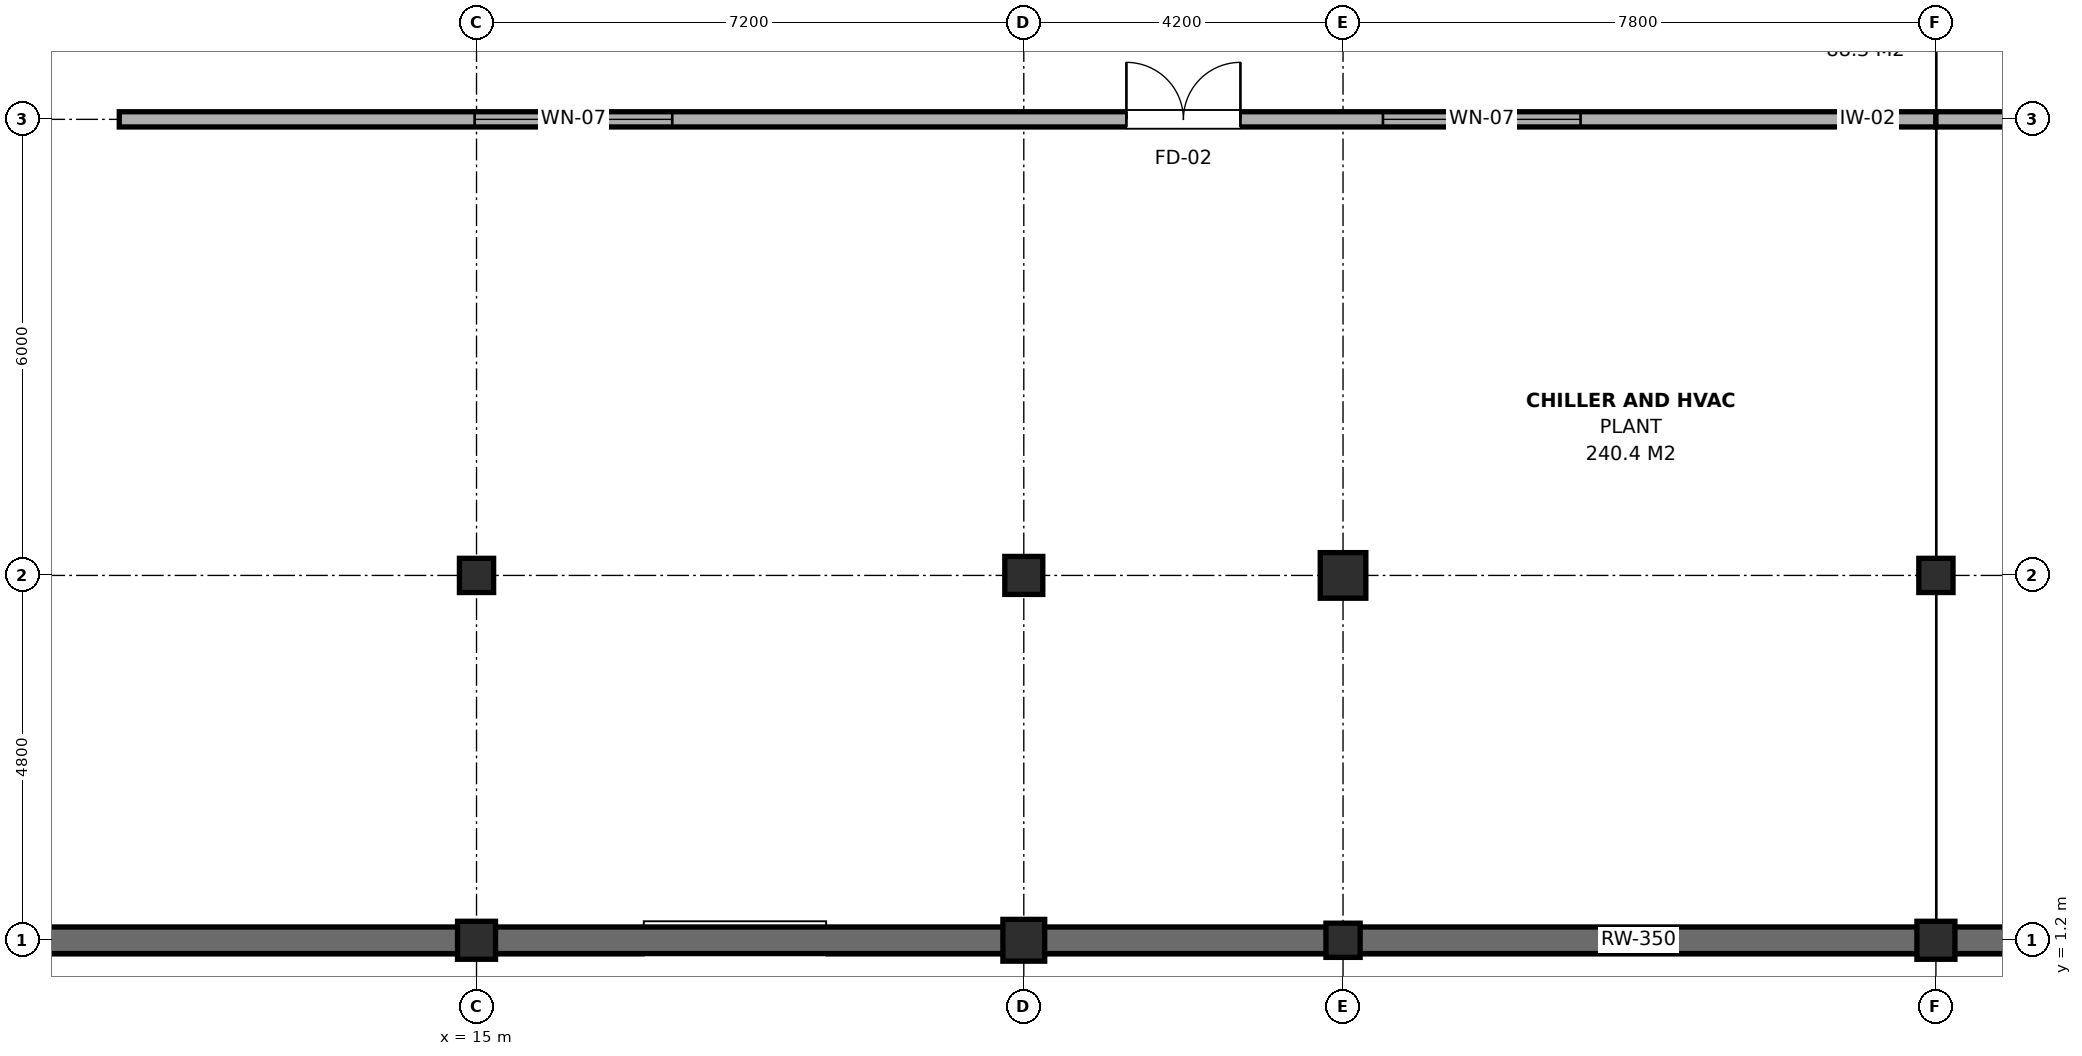
"""IFC4 building model, lengths in metres.
Left out: names, types, materials, properties, quantities, classifications, styles, units other than length and angle.
Written with IfcOpenShell. Run it as: python <this file> out.ifc"""

import sys

from ifc_helpers import new_model, si_unit, direction, frame, frame_2d, origin, origin_2d, place, context, subcontext, project, spatial, rectangle, extrude, element, fill, save


model = new_model("IFC4")
c1 = context("Model", 3, precision=1e-05, world=origin(), true_north=direction((0.0, 1.0)))
c2 = subcontext(c1, "Body", "Model", "MODEL_VIEW")
j1 = project(units=[si_unit("LENGTHUNIT", "METRE"), si_unit("PLANEANGLEUNIT", "RADIAN")], contexts=[c1])
p1 = place(None, origin())
s1 = spatial("IfcSite", under=j1, at=p1, CompositionType="ELEMENT")
p2 = place(p1, origin())
s2 = spatial("IfcBuilding", under=s1, at=p2, CompositionType="ELEMENT")
p3 = place(p2, frame((0.0, 0.0, -4.2)))
s3 = spatial("IfcBuildingStorey", under=s2, at=p3, CompositionType="ELEMENT", Elevation=-4.2)
p4 = place(p3, frame((15.0, 1.2, 0.0), z_axis=(0.0, 0.0, 1.0), x_axis=(1.0, 0.0, 0.0)))
e1 = element("IfcColumn", 1, at=p4, inside=s3, PredefinedType="COLUMN", context=c2, shape_type="SweptSolid", body=[
    extrude(rectangle(XDim=0.5, YDim=0.5, at=origin_2d()), origin(), (0.0, 0.0, 1.0), 4.2),
])
p5 = place(p3, frame((15.0, 6.0, 0.0), z_axis=(0.0, 0.0, 1.0), x_axis=(1.0, 0.0, 0.0)))
e2 = element("IfcColumn", 2, at=p5, inside=s3, PredefinedType="COLUMN", context=c2, shape_type="SweptSolid", body=[
    extrude(rectangle(XDim=0.45, YDim=0.45, at=origin_2d()), origin(), (0.0, 0.0, 1.0), 4.2),
])
p6 = place(p3, frame((22.2, 1.2, 0.0), z_axis=(0.0, 0.0, 1.0), x_axis=(1.0, 0.0, 0.0)))
e3 = element("IfcColumn", 3, at=p6, inside=s3, PredefinedType="COLUMN", context=c2, shape_type="SweptSolid", body=[
    extrude(rectangle(XDim=0.55, YDim=0.55, at=origin_2d()), origin(), (0.0, 0.0, 1.0), 4.2),
])
p7 = place(p3, frame((22.2, 6.0, 0.0), z_axis=(0.0, 0.0, 1.0), x_axis=(1.0, 0.0, 0.0)))
e4 = element("IfcColumn", 4, at=p7, inside=s3, PredefinedType="COLUMN", context=c2, shape_type="SweptSolid", body=[
    extrude(rectangle(XDim=0.5, YDim=0.5, at=origin_2d()), origin(), (0.0, 0.0, 1.0), 4.2),
])
p8 = place(p3, frame((26.4, 1.2, 0.0), z_axis=(0.0, 0.0, 1.0), x_axis=(1.0, 0.0, 0.0)))
e5 = element("IfcColumn", 5, at=p8, inside=s3, PredefinedType="COLUMN", context=c2, shape_type="SweptSolid", body=[
    extrude(rectangle(XDim=0.45, YDim=0.45, at=origin_2d()), origin(), (0.0, 0.0, 1.0), 4.2),
])
p9 = place(p3, frame((26.4, 6.0, 0.0), z_axis=(0.0, 0.0, 1.0), x_axis=(1.0, 0.0, 0.0)))
e6 = element("IfcColumn", 6, at=p9, inside=s3, PredefinedType="COLUMN", context=c2, shape_type="SweptSolid", body=[
    extrude(rectangle(XDim=0.6, YDim=0.6, at=origin_2d()), origin(), (0.0, 0.0, 1.0), 4.2),
])
p10 = place(p3, frame((34.2, 1.2, 0.0), z_axis=(0.0, 0.0, 1.0), x_axis=(1.0, 0.0, 0.0)))
e7 = element("IfcColumn", 7, at=p10, inside=s3, PredefinedType="COLUMN", context=c2, shape_type="SweptSolid", body=[
    extrude(rectangle(XDim=0.5, YDim=0.5, at=origin_2d()), origin(), (0.0, 0.0, 1.0), 4.2),
])
p11 = place(p3, frame((34.2, 6.0, 0.0), z_axis=(0.0, 0.0, 1.0), x_axis=(1.0, 0.0, 0.0)))
e8 = element("IfcColumn", 8, at=p11, inside=s3, PredefinedType="COLUMN", context=c2, shape_type="SweptSolid", body=[
    extrude(rectangle(XDim=0.45, YDim=0.45, at=origin_2d()), origin(), (0.0, 0.0, 1.0), 4.2),
])
p12 = place(p3, frame((0.425, 1.2, 0.0), z_axis=(0.0, 0.0, 1.0), x_axis=(1.0, 0.0, 0.0)))
e9 = element("IfcWall", 9, at=p12, inside=s3, PredefinedType="USERDEFINED", context=c2, shape_type="SweptSolid", body=[
    extrude(rectangle(XDim=63.35, YDim=0.35, at=frame_2d((31.675, 0.0))), origin(), (0.0, 0.0, 1.0), 3.92),
])
p13 = place(p3, frame((10.3, 12.0, 0.0), z_axis=(0.0, 0.0, 1.0), x_axis=(1.0, 0.0, 0.0)))
e10 = element("IfcWall", 10, at=p13, inside=s3, PredefinedType="PARTITIONING", context=c2, shape_type="SweptSolid", body=[
    extrude(rectangle(XDim=23.9, YDim=0.2, at=frame_2d((11.95, 0.0))), origin(), (0.0, 0.0, 1.0), 3.065),
])
p14 = place(p13, frame((13.25, 0.0, 0.0)))
e11 = element("IfcOpeningElement", 11, at=p14, cuts=e10, PredefinedType="OPENING", context=c2, shape_type="SweptSolid", body=[
    extrude(rectangle(XDim=1.5, YDim=2.15, at=frame_2d((0.75, 1.075))), frame((0.0, 0.115, 0.0), z_axis=(0.0, -1.0, 0.0), x_axis=(1.0, 0.0, 0.0)), (0.0, 0.0, 1.0), 0.23),
])
p15 = place(p13, frame((4.675, 0.0, 0.95)))
e12 = element("IfcOpeningElement", 12, at=p15, cuts=e10, PredefinedType="OPENING", context=c2, shape_type="SweptSolid", body=[
    extrude(rectangle(XDim=2.6, YDim=1.5, at=frame_2d((1.3, 0.75))), frame((0.0, 0.115, 0.0), z_axis=(0.0, -1.0, 0.0), x_axis=(1.0, 0.0, 0.0)), (0.0, 0.0, 1.0), 0.23),
])
p16 = place(p13, frame((16.625, 0.0, 0.95)))
e13 = element("IfcOpeningElement", 13, at=p16, cuts=e10, PredefinedType="OPENING", context=c2, shape_type="SweptSolid", body=[
    extrude(rectangle(XDim=2.6, YDim=1.5, at=frame_2d((1.3, 0.75))), frame((0.0, 0.115, 0.0), z_axis=(0.0, -1.0, 0.0), x_axis=(1.0, 0.0, 0.0)), (0.0, 0.0, 1.0), 0.23),
])
p17 = place(p3, frame((34.2, 12.0, 0.0), z_axis=(0.0, 0.0, 1.0), x_axis=(1.0, 0.0, 0.0)))
e14 = element("IfcWall", 14, at=p17, inside=s3, PredefinedType="PARTITIONING", context=c2, shape_type="SweptSolid", body=[
    extrude(rectangle(XDim=15.2, YDim=0.2, at=frame_2d((7.6, 0.0))), origin(), (0.0, 0.0, 1.0), 3.015),
])
p18 = place(p17, frame((8.25, 0.0, 0.0)))
e15 = element("IfcOpeningElement", 15, at=p18, cuts=e14, PredefinedType="OPENING", context=c2, shape_type="SweptSolid", body=[
    extrude(rectangle(XDim=1.5, YDim=2.15, at=frame_2d((0.75, 1.075))), frame((0.0, 0.115, 0.0), z_axis=(0.0, -1.0, 0.0), x_axis=(1.0, 0.0, 0.0)), (0.0, 0.0, 1.0), 0.23),
])
p19 = place(p14, origin())
e16 = element("IfcDoor", 16, at=p19, inside=s3, OperationType="DOUBLE_DOOR_SINGLE_SWING", PredefinedType="DOOR", context=c2, shape_type="SweptSolid", body=[
    extrude(rectangle(XDim=1.5, YDim=2.15, at=frame_2d((0.75, 1.075))), frame((0.0, 0.025, 0.0), z_axis=(0.0, -1.0, 0.0), x_axis=(1.0, 0.0, 0.0)), (0.0, 0.0, 1.0), 0.05),
])
fill(e11, e16)
p20 = place(p15, origin())
e17 = element("IfcWindow", 17, at=p20, inside=s3, PartitioningType="SINGLE_PANEL", PredefinedType="WINDOW", context=c2, shape_type="SweptSolid", body=[
    extrude(rectangle(XDim=2.6, YDim=1.5, at=frame_2d((1.3, 0.75))), frame((0.0, 0.03, 0.0), z_axis=(0.0, -1.0, 0.0), x_axis=(1.0, 0.0, 0.0)), (0.0, 0.0, 1.0), 0.06),
])
fill(e12, e17)
p21 = place(p16, origin())
e18 = element("IfcWindow", 18, at=p21, inside=s3, PartitioningType="SINGLE_PANEL", PredefinedType="WINDOW", context=c2, shape_type="SweptSolid", body=[
    extrude(rectangle(XDim=2.6, YDim=1.5, at=frame_2d((1.3, 0.75))), frame((0.0, 0.03, 0.0), z_axis=(0.0, -1.0, 0.0), x_axis=(1.0, 0.0, 0.0)), (0.0, 0.0, 1.0), 0.06),
])
fill(e13, e18)
save(model, sys.argv[1])
